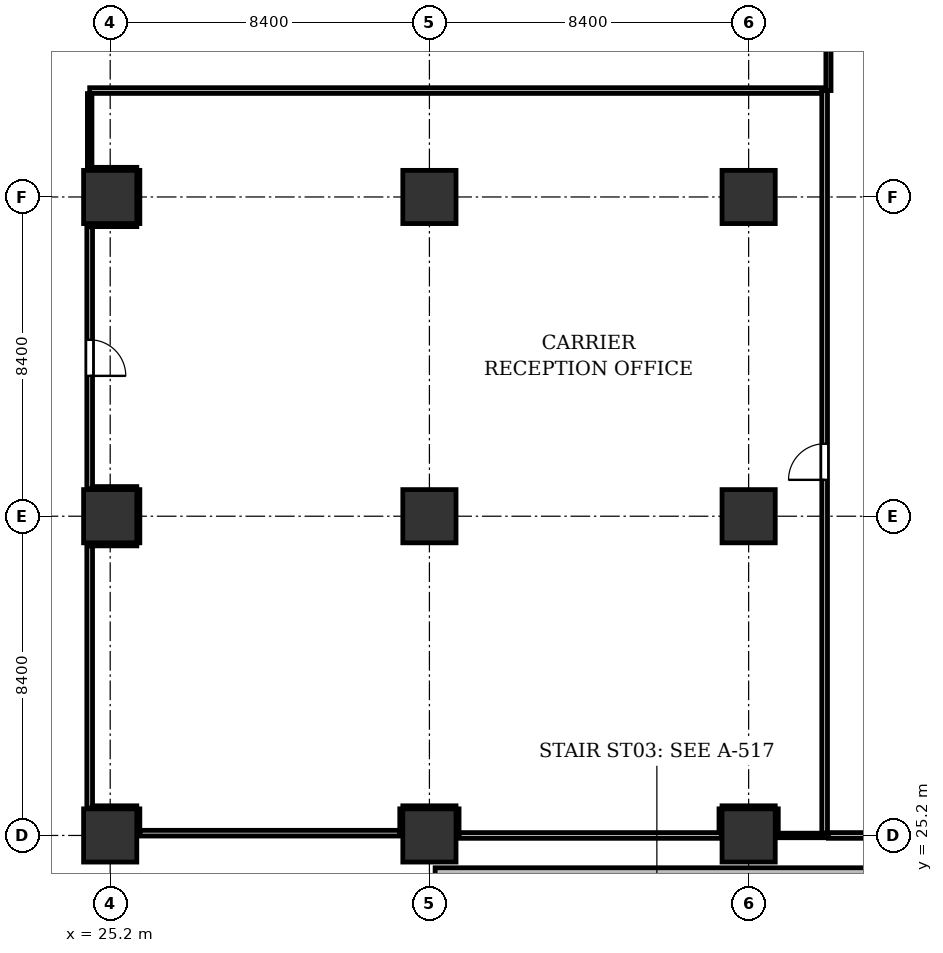
"""IFC4 building model, lengths in metres.
Left out: names, types, materials, properties, quantities, classifications, styles, units other than length and angle.
Written with IfcOpenShell. Run it as: python <this file> out.ifc"""

import sys

from ifc_helpers import new_model, si_unit, direction, frame, frame_2d, origin, origin_2d, place, context, subcontext, project, spatial, rectangle, extrude, element, fill, save


model = new_model("IFC4")
c1 = context("Model", 3, precision=1e-05, world=origin(), true_north=direction((0.0, 1.0)))
c2 = subcontext(c1, "Body", "Model", "MODEL_VIEW")
j1 = project(units=[si_unit("LENGTHUNIT", "METRE"), si_unit("PLANEANGLEUNIT", "RADIAN")], contexts=[c1])
p1 = place(None, origin())
s1 = spatial("IfcSite", under=j1, at=p1, CompositionType="ELEMENT")
p2 = place(p1, origin())
s2 = spatial("IfcBuilding", under=s1, at=p2, CompositionType="ELEMENT")
p3 = place(p2, origin())
s3 = spatial("IfcBuildingStorey", under=s2, at=p3, CompositionType="ELEMENT", Elevation=0.0)
for number, where, z_axis, x_axis in (
    (1, (25.2, 25.2, 0.0), (0.0, 0.0, 1.0), (1.0, 0.0, 0.0)),
    (2, (25.2, 33.6, 0.0), (0.0, 0.0, 1.0), (1.0, 0.0, 0.0)),
    (3, (25.2, 42.0, 0.0), (0.0, 0.0, 1.0), (1.0, 0.0, 0.0)),
    (4, (33.6, 25.2, 0.0), (0.0, 0.0, 1.0), (1.0, 0.0, 0.0)),
    (5, (33.6, 33.6, 0.0), (0.0, 0.0, 1.0), (1.0, 0.0, 0.0)),
    (6, (33.6, 42.0, 0.0), (0.0, 0.0, 1.0), (1.0, 0.0, 0.0)),
    (7, (42.0, 25.2, 0.0), (0.0, 0.0, 1.0), (1.0, 0.0, 0.0)),
    (8, (42.0, 33.6, 0.0), (0.0, 0.0, 1.0), (1.0, 0.0, 0.0)),
    (9, (42.0, 42.0, 0.0), (0.0, 0.0, 1.0), (1.0, 0.0, 0.0)),
):
    element("IfcColumn", number, at=place(p3, frame(where, z_axis=z_axis, x_axis=x_axis)), inside=s3, PredefinedType="COLUMN", context=c2, shape_type="SweptSolid", body=[
        extrude(rectangle(XDim=1.4, YDim=1.4, at=origin_2d()), origin(), (0.0, 0.0, 1.0), 5.4),
    ])
p4 = place(p3, frame((58.656, 24.25, 0.0), z_axis=(0.0, 0.0, 1.0), x_axis=(-1.0, 0.0, 0.0)))
e10 = element("IfcWall", 10, at=p4, inside=s3, PredefinedType="PARTITIONING", context=c2, shape_type="SweptSolid", body=[
    extrude(rectangle(XDim=24.906, YDim=0.2, at=frame_2d((12.453, 0.0))), origin(), (0.0, 0.0, 1.0), 4.513),
])
p5 = place(p3, frame((32.88, 25.26, 0.0), z_axis=(0.0, 0.0, 1.0), x_axis=(0.0, 1.0, 0.0)))
e11 = element("IfcWall", 11, at=p5, inside=s3, PredefinedType="PARTITIONING", context=c2, shape_type="SweptSolid", body=[
    extrude(rectangle(XDim=0.64, YDim=0.12, at=frame_2d((0.32, 0.0))), origin(), (0.0, 0.0, 1.0), 4.325),
])
p6 = place(p3, frame((32.9, 25.92, 0.0), z_axis=(0.0, 0.0, 1.0), x_axis=(1.0, 0.0, 0.0)))
e12 = element("IfcWall", 12, at=p6, inside=s3, PredefinedType="PARTITIONING", context=c2, shape_type="SweptSolid", body=[
    extrude(rectangle(XDim=1.4, YDim=0.12, at=frame_2d((0.7, 0.0))), origin(), (0.0, 0.0, 1.0), 4.513),
])
p7 = place(p3, frame((34.32, 25.9, 0.0), z_axis=(0.0, 0.0, 1.0), x_axis=(0.0, -1.0, 0.0)))
e13 = element("IfcWall", 13, at=p7, inside=s3, PredefinedType="PARTITIONING", context=c2, shape_type="SweptSolid", body=[
    extrude(rectangle(XDim=0.7, YDim=0.12, at=frame_2d((0.35, 0.0))), origin(), (0.0, 0.0, 1.0), 4.325),
])
p8 = place(p3, frame((34.384, 25.2, 0.0), z_axis=(0.0, 0.0, 1.0), x_axis=(1.0, 0.0, 0.0)))
e14 = element("IfcWall", 14, at=p8, inside=s3, PredefinedType="PARTITIONING", context=c2, shape_type="SweptSolid", body=[
    extrude(rectangle(XDim=6.896, YDim=0.15, at=frame_2d((3.448, 0.0))), origin(), (0.0, 0.0, 1.0), 4.325),
])
p9 = place(p3, frame((41.28, 25.279, 0.0), z_axis=(0.0, 0.0, 1.0), x_axis=(0.0, 1.0, 0.0)))
e15 = element("IfcWall", 15, at=p9, inside=s3, PredefinedType="PARTITIONING", context=c2, shape_type="SweptSolid", body=[
    extrude(rectangle(XDim=0.621, YDim=0.12, at=frame_2d((0.311, 0.0))), origin(), (0.0, 0.0, 1.0), 4.325),
])
p10 = place(p3, frame((41.3, 25.92, 0.0), z_axis=(0.0, 0.0, 1.0), x_axis=(1.0, 0.0, 0.0)))
e16 = element("IfcWall", 16, at=p10, inside=s3, PredefinedType="PARTITIONING", context=c2, shape_type="SweptSolid", body=[
    extrude(rectangle(XDim=1.4, YDim=0.12, at=frame_2d((0.7, 0.0))), origin(), (0.0, 0.0, 1.0), 4.513),
])
p11 = place(p3, frame((42.72, 25.9, 0.0), z_axis=(0.0, 0.0, 1.0), x_axis=(0.0, -1.0, 0.0)))
e17 = element("IfcWall", 17, at=p11, inside=s3, PredefinedType="PARTITIONING", context=c2, shape_type="SweptSolid", body=[
    extrude(rectangle(XDim=0.7, YDim=0.12, at=frame_2d((0.35, 0.0))), origin(), (0.0, 0.0, 1.0), 4.325),
])
p12 = place(p3, frame((42.784, 25.2, 0.0), z_axis=(0.0, 0.0, 1.0), x_axis=(1.0, 0.0, 0.0)))
e18 = element("IfcWall", 18, at=p12, inside=s3, PredefinedType="PARTITIONING", context=c2, shape_type="SweptSolid", body=[
    extrude(rectangle(XDim=1.216, YDim=0.12, at=frame_2d((0.608, 0.0))), origin(), (0.0, 0.0, 1.0), 4.325),
])
p13 = place(p3, frame((44.0, 25.264, 0.0), z_axis=(0.0, 0.0, 1.0), x_axis=(0.0, 1.0, 0.0)))
e19 = element("IfcWall", 19, at=p13, inside=s3, PredefinedType="PARTITIONING", context=c2, shape_type="SweptSolid", body=[
    extrude(rectangle(XDim=19.536, YDim=0.15, at=frame_2d((9.768, 0.0))), origin(), (0.0, 0.0, 1.0), 4.325),
])
p14 = place(p13, frame((9.293, 0.0, 0.0)))
e20 = element("IfcOpeningElement", 20, at=p14, cuts=e19, PredefinedType="OPENING", context=c2, shape_type="SweptSolid", body=[
    extrude(rectangle(XDim=0.95, YDim=2.15, at=frame_2d((0.475, 1.075))), frame((0.0, 0.085, 0.0), z_axis=(0.0, -1.0, 0.0), x_axis=(1.0, 0.0, 0.0)), (0.0, 0.0, 1.0), 0.17),
])
p15 = place(p3, frame((43.921, 44.8, 0.0), z_axis=(0.0, 0.0, 1.0), x_axis=(-1.0, 0.0, 0.0)))
e21 = element("IfcWall", 21, at=p15, inside=s3, PredefinedType="PARTITIONING", context=c2, shape_type="SweptSolid", body=[
    extrude(rectangle(XDim=19.261, YDim=0.15, at=frame_2d((9.63, 0.0))), origin(), (0.0, 0.0, 1.0), 4.513),
])
p16 = place(p3, frame((24.66, 44.721, 0.0), z_axis=(0.0, 0.0, 1.0), x_axis=(0.0, -1.0, 0.0)))
e22 = element("IfcWall", 22, at=p16, inside=s3, PredefinedType="PARTITIONING", context=c2, shape_type="SweptSolid", body=[
    extrude(rectangle(XDim=2.001, YDim=0.12, at=frame_2d((1.0, 0.0))), origin(), (0.0, 0.0, 1.0), 5.125),
])
p17 = place(p3, frame((24.724, 42.72, 0.0), z_axis=(0.0, 0.0, 1.0), x_axis=(1.0, 0.0, 0.0)))
e23 = element("IfcWall", 23, at=p17, inside=s3, PredefinedType="PARTITIONING", context=c2, shape_type="SweptSolid", body=[
    extrude(rectangle(XDim=1.176, YDim=0.12, at=frame_2d((0.588, 0.0))), origin(), (0.0, 0.0, 1.0), 4.513),
])
p18 = place(p3, frame((25.92, 42.7, 0.0), z_axis=(0.0, 0.0, 1.0), x_axis=(0.0, -1.0, 0.0)))
e24 = element("IfcWall", 24, at=p18, inside=s3, PredefinedType="PARTITIONING", context=c2, shape_type="SweptSolid", body=[
    extrude(rectangle(XDim=1.4, YDim=0.12, at=frame_2d((0.7, 0.0))), origin(), (0.0, 0.0, 1.0), 4.325),
])
p19 = place(p3, frame((25.9, 41.28, 0.0), z_axis=(0.0, 0.0, 1.0), x_axis=(-1.0, 0.0, 0.0)))
e25 = element("IfcWall", 25, at=p19, inside=s3, PredefinedType="PARTITIONING", context=c2, shape_type="SweptSolid", body=[
    extrude(rectangle(XDim=1.24, YDim=0.12, at=frame_2d((0.62, 0.0))), origin(), (0.0, 0.0, 1.0), 4.513),
])
p20 = place(p3, frame((24.66, 41.216, 0.0), z_axis=(0.0, 0.0, 1.0), x_axis=(0.0, -1.0, 0.0)))
e26 = element("IfcWall", 26, at=p20, inside=s3, PredefinedType="PARTITIONING", context=c2, shape_type="SweptSolid", body=[
    extrude(rectangle(XDim=6.896, YDim=0.15, at=frame_2d((3.448, 0.0))), origin(), (0.0, 0.0, 1.0), 5.125),
])
p21 = place(p20, frame((2.973, 0.0, 0.0)))
e27 = element("IfcOpeningElement", 27, at=p21, cuts=e26, PredefinedType="OPENING", context=c2, shape_type="SweptSolid", body=[
    extrude(rectangle(XDim=0.95, YDim=2.15, at=frame_2d((0.475, 1.075))), frame((0.0, 0.085, 0.0), z_axis=(0.0, -1.0, 0.0), x_axis=(1.0, 0.0, 0.0)), (0.0, 0.0, 1.0), 0.17),
])
p22 = place(p3, frame((24.739, 34.32, 0.0), z_axis=(0.0, 0.0, 1.0), x_axis=(1.0, 0.0, 0.0)))
e28 = element("IfcWall", 28, at=p22, inside=s3, PredefinedType="PARTITIONING", context=c2, shape_type="SweptSolid", body=[
    extrude(rectangle(XDim=1.161, YDim=0.12, at=frame_2d((0.581, 0.0))), origin(), (0.0, 0.0, 1.0), 4.513),
])
p23 = place(p3, frame((25.92, 34.3, 0.0), z_axis=(0.0, 0.0, 1.0), x_axis=(0.0, -1.0, 0.0)))
e29 = element("IfcWall", 29, at=p23, inside=s3, PredefinedType="PARTITIONING", context=c2, shape_type="SweptSolid", body=[
    extrude(rectangle(XDim=1.4, YDim=0.12, at=frame_2d((0.7, 0.0))), origin(), (0.0, 0.0, 1.0), 4.325),
])
p24 = place(p3, frame((25.9, 32.88, 0.0), z_axis=(0.0, 0.0, 1.0), x_axis=(-1.0, 0.0, 0.0)))
e30 = element("IfcWall", 30, at=p24, inside=s3, PredefinedType="PARTITIONING", context=c2, shape_type="SweptSolid", body=[
    extrude(rectangle(XDim=1.24, YDim=0.12, at=frame_2d((0.62, 0.0))), origin(), (0.0, 0.0, 1.0), 4.513),
])
p25 = place(p3, frame((24.66, 32.816, 0.0), z_axis=(0.0, 0.0, 1.0), x_axis=(0.0, -1.0, 0.0)))
e31 = element("IfcWall", 31, at=p25, inside=s3, PredefinedType="PARTITIONING", context=c2, shape_type="SweptSolid", body=[
    extrude(rectangle(XDim=6.896, YDim=0.15, at=frame_2d((3.448, 0.0))), origin(), (0.0, 0.0, 1.0), 5.125),
])
p26 = place(p3, frame((24.739, 25.92, 0.0), z_axis=(0.0, 0.0, 1.0), x_axis=(1.0, 0.0, 0.0)))
e32 = element("IfcWall", 32, at=p26, inside=s3, PredefinedType="PARTITIONING", context=c2, shape_type="SweptSolid", body=[
    extrude(rectangle(XDim=1.161, YDim=0.12, at=frame_2d((0.581, 0.0))), origin(), (0.0, 0.0, 1.0), 4.513),
])
p27 = place(p3, frame((25.92, 25.9, 0.0), z_axis=(0.0, 0.0, 1.0), x_axis=(0.0, -1.0, 0.0)))
e33 = element("IfcWall", 33, at=p27, inside=s3, PredefinedType="PARTITIONING", context=c2, shape_type="SweptSolid", body=[
    extrude(rectangle(XDim=0.64, YDim=0.12, at=frame_2d((0.32, 0.0))), origin(), (0.0, 0.0, 1.0), 4.325),
])
p28 = place(p3, frame((25.984, 25.26, 0.0), z_axis=(0.0, 0.0, 1.0), x_axis=(1.0, 0.0, 0.0)))
e34 = element("IfcWall", 34, at=p28, inside=s3, PredefinedType="PARTITIONING", context=c2, shape_type="SweptSolid", body=[
    extrude(rectangle(XDim=6.832, YDim=0.15, at=frame_2d((3.416, 0.0))), origin(), (0.0, 0.0, 1.0), 4.325),
])
p29 = place(p3, frame((44.1, 25.2, 0.0), z_axis=(0.0, 0.0, 1.0), x_axis=(1.0, 0.0, 0.0)))
e35 = element("IfcWall", 35, at=p29, inside=s3, PredefinedType="PARTITIONING", context=c2, shape_type="SweptSolid", body=[
    extrude(rectangle(XDim=5.58, YDim=0.15, at=frame_2d((2.79, 0.0))), origin(), (0.0, 0.0, 1.0), 4.325),
])
p30 = place(p3, frame((44.1, 50.256, 0.0), z_axis=(0.0, 0.0, 1.0), x_axis=(0.0, -1.0, 0.0)))
e36 = element("IfcWall", 36, at=p30, inside=s3, PredefinedType="PARTITIONING", context=c2, shape_type="SweptSolid", body=[
    extrude(rectangle(XDim=5.456, YDim=0.135, at=frame_2d((2.728, 0.0))), origin(), (0.0, 0.0, 1.0), 5.125),
])
p31 = place(p21, origin())
e37 = element("IfcDoor", 37, at=p31, inside=s3, OperationType="SINGLE_SWING_RIGHT", PredefinedType="DOOR", context=c2, shape_type="SweptSolid", body=[
    extrude(rectangle(XDim=0.95, YDim=2.15, at=frame_2d((0.475, 1.075))), frame((0.0, 0.025, 0.0), z_axis=(0.0, -1.0, 0.0), x_axis=(1.0, 0.0, 0.0)), (0.0, 0.0, 1.0), 0.05),
])
fill(e27, e37)
p32 = place(p14, origin())
e38 = element("IfcDoor", 38, at=p32, inside=s3, OperationType="SINGLE_SWING_LEFT", PredefinedType="DOOR", context=c2, shape_type="SweptSolid", body=[
    extrude(rectangle(XDim=0.95, YDim=2.15, at=frame_2d((0.475, 1.075))), frame((0.0, 0.025, 0.0), z_axis=(0.0, -1.0, 0.0), x_axis=(1.0, 0.0, 0.0)), (0.0, 0.0, 1.0), 0.05),
])
fill(e20, e38)
save(model, sys.argv[1])
